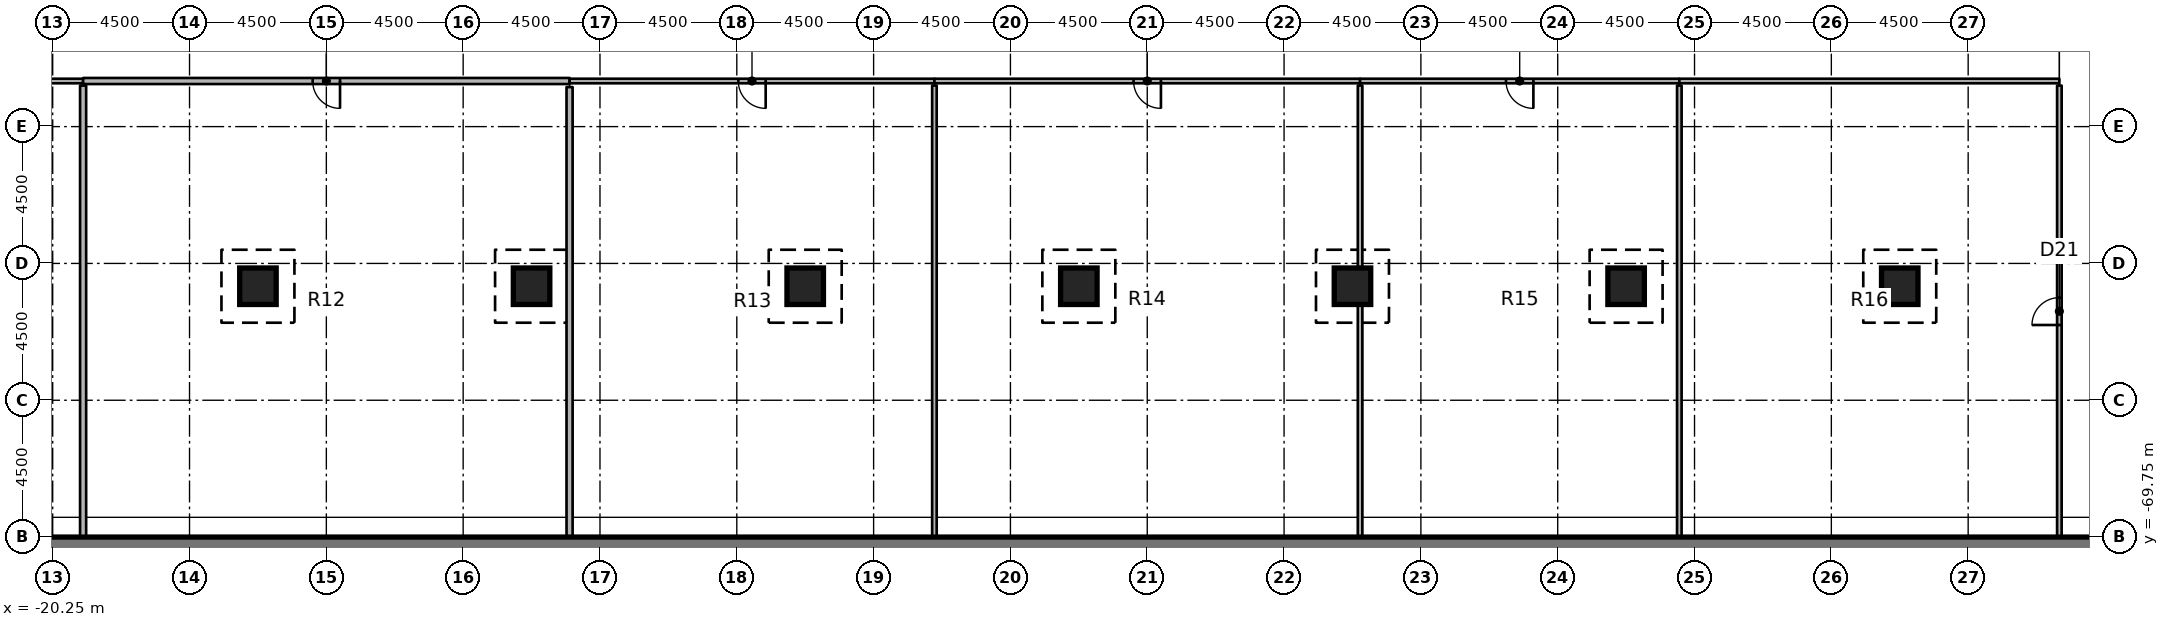
"""IFC4 building model, lengths in metres.
Left out: names, types, materials, properties, quantities, classifications, styles, units other than length and angle.
Written with IfcOpenShell. Run it as: python <this file> out.ifc"""

import sys

from ifc_helpers import new_model, si_unit, direction, frame, frame_2d, origin, origin_2d, place, context, subcontext, project, spatial, rectangle, extrude, element, fill, save


model = new_model("IFC4")
c1 = context("Model", 3, precision=1e-05, world=origin(), true_north=direction((0.0, 1.0)))
c2 = subcontext(c1, "Body", "Model", "MODEL_VIEW")
j1 = project(units=[si_unit("LENGTHUNIT", "METRE"), si_unit("PLANEANGLEUNIT", "RADIAN")], contexts=[c1])
p1 = place(None, origin())
s1 = spatial("IfcSite", under=j1, at=p1, CompositionType="ELEMENT")
p2 = place(p1, origin())
s2 = spatial("IfcBuilding", under=s1, at=p2, CompositionType="ELEMENT")
p3 = place(p2, frame((0.0, 0.0, -8.0)))
s3 = spatial("IfcBuildingStorey", under=s2, at=p3, CompositionType="ELEMENT", Elevation=-8.0)
for number, where, z_axis, x_axis in (
    (1, (-13.5, -61.5, 0.0), (0.0, 0.0, 1.0), (1.0, 0.0, 0.0)),
    (2, (-4.5, -61.5, 0.0), (0.0, 0.0, 1.0), (1.0, 0.0, 0.0)),
    (3, (4.5, -61.5, 0.0), (0.0, 0.0, 1.0), (1.0, 0.0, 0.0)),
    (4, (13.5, -61.5, 0.0), (0.0, 0.0, 1.0), (1.0, 0.0, 0.0)),
    (5, (22.5, -61.5, 0.0), (0.0, 0.0, 1.0), (1.0, 0.0, 0.0)),
    (6, (31.5, -61.5, 0.0), (0.0, 0.0, 1.0), (1.0, 0.0, 0.0)),
    (7, (40.5, -61.5, 0.0), (0.0, 0.0, 1.0), (1.0, 0.0, 0.0)),
):
    element("IfcColumn", number, at=place(p3, frame(where, z_axis=z_axis, x_axis=x_axis)), inside=s3, PredefinedType="COLUMN", context=c2, shape_type="SweptSolid", body=[
        extrude(rectangle(XDim=1.2, YDim=1.2, at=origin_2d()), origin(), (0.0, 0.0, 1.0), 3.4),
    ])
p4 = place(p3, frame((-61.25, -70.0, 0.0), z_axis=(0.0, 0.0, 1.0), x_axis=(1.0, 0.0, 0.0)))
e8 = element("IfcWall", 8, at=p4, inside=s3, PredefinedType="SOLIDWALL", context=c2, shape_type="SweptSolid", body=[
    extrude(rectangle(XDim=122.5, YDim=0.5, at=frame_2d((61.25, 0.0))), origin(), (0.0, 0.0, 1.0), 4.0),
])
p5 = place(p3, frame((-19.25, -54.75, 0.0), z_axis=(0.0, 0.0, 1.0), x_axis=(-1.0, 0.0, 0.0)))
e9 = element("IfcWall", 9, at=p5, inside=s3, PredefinedType="PARTITIONING", context=c2, shape_type="SweptSolid", body=[
    extrude(rectangle(XDim=11.0, YDim=0.15, at=frame_2d((5.5, 0.0))), origin(), (0.0, 0.0, 1.0), 3.4),
])
p6 = place(p5, frame((5.05, 0.0, 0.0)))
e10 = element("IfcOpeningElement", 10, at=p6, cuts=e9, PredefinedType="OPENING", context=c2, shape_type="SweptSolid", body=[
    extrude(rectangle(XDim=0.9, YDim=2.1, at=frame_2d((0.45, 1.05))), frame((0.0, 0.085, 0.0), z_axis=(0.0, -1.0, 0.0), x_axis=(1.0, 0.0, 0.0)), (0.0, 0.0, 1.0), 0.17),
])
p7 = place(p3, frame((-3.25, -54.75, 0.0), z_axis=(0.0, 0.0, 1.0), x_axis=(-1.0, 0.0, 0.0)))
e11 = element("IfcWall", 11, at=p7, inside=s3, PredefinedType="PARTITIONING", context=c2, shape_type="SweptSolid", body=[
    extrude(rectangle(XDim=16.0, YDim=0.2, at=frame_2d((8.0, 0.0))), origin(), (0.0, 0.0, 1.0), 3.4),
])
p8 = place(p7, frame((7.55, 0.0, 0.0)))
e12 = element("IfcOpeningElement", 12, at=p8, cuts=e11, PredefinedType="OPENING", context=c2, shape_type="SweptSolid", body=[
    extrude(rectangle(XDim=0.9, YDim=2.1, at=frame_2d((0.45, 1.05))), frame((0.0, 0.11, 0.0), z_axis=(0.0, -1.0, 0.0), x_axis=(1.0, 0.0, 0.0)), (0.0, 0.0, 1.0), 0.22),
])
p9 = place(p3, frame((8.75, -54.75, 0.0), z_axis=(0.0, 0.0, 1.0), x_axis=(-1.0, 0.0, 0.0)))
e13 = element("IfcWall", 13, at=p9, inside=s3, PredefinedType="PARTITIONING", context=c2, shape_type="SweptSolid", body=[
    extrude(rectangle(XDim=12.0, YDim=0.15, at=frame_2d((6.0, 0.0))), origin(), (0.0, 0.0, 1.0), 3.4),
])
p10 = place(p9, frame((5.55, 0.0, 0.0)))
e14 = element("IfcOpeningElement", 14, at=p10, cuts=e13, PredefinedType="OPENING", context=c2, shape_type="SweptSolid", body=[
    extrude(rectangle(XDim=0.9, YDim=2.1, at=frame_2d((0.45, 1.05))), frame((0.0, 0.085, 0.0), z_axis=(0.0, -1.0, 0.0), x_axis=(1.0, 0.0, 0.0)), (0.0, 0.0, 1.0), 0.17),
])
p11 = place(p3, frame((22.75, -54.75, 0.0), z_axis=(0.0, 0.0, 1.0), x_axis=(-1.0, 0.0, 0.0)))
e15 = element("IfcWall", 15, at=p11, inside=s3, PredefinedType="PARTITIONING", context=c2, shape_type="SweptSolid", body=[
    extrude(rectangle(XDim=14.0, YDim=0.15, at=frame_2d((7.0, 0.0))), origin(), (0.0, 0.0, 1.0), 3.4),
])
p12 = place(p11, frame((6.55, 0.0, 0.0)))
e16 = element("IfcOpeningElement", 16, at=p12, cuts=e15, PredefinedType="OPENING", context=c2, shape_type="SweptSolid", body=[
    extrude(rectangle(XDim=0.9, YDim=2.1, at=frame_2d((0.45, 1.05))), frame((0.0, 0.085, 0.0), z_axis=(0.0, -1.0, 0.0), x_axis=(1.0, 0.0, 0.0)), (0.0, 0.0, 1.0), 0.17),
])
p13 = place(p3, frame((33.25, -54.75, 0.0), z_axis=(0.0, 0.0, 1.0), x_axis=(-1.0, 0.0, 0.0)))
e17 = element("IfcWall", 17, at=p13, inside=s3, PredefinedType="PARTITIONING", context=c2, shape_type="SweptSolid", body=[
    extrude(rectangle(XDim=10.5, YDim=0.15, at=frame_2d((5.25, 0.0))), origin(), (0.0, 0.0, 1.0), 3.4),
])
p14 = place(p13, frame((4.8, 0.0, 0.0)))
e18 = element("IfcOpeningElement", 18, at=p14, cuts=e17, PredefinedType="OPENING", context=c2, shape_type="SweptSolid", body=[
    extrude(rectangle(XDim=0.9, YDim=2.1, at=frame_2d((0.45, 1.05))), frame((0.0, 0.085, 0.0), z_axis=(0.0, -1.0, 0.0), x_axis=(1.0, 0.0, 0.0)), (0.0, 0.0, 1.0), 0.17),
])
p15 = place(p3, frame((45.75, -54.75, 0.0), z_axis=(0.0, 0.0, 1.0), x_axis=(-1.0, 0.0, 0.0)))
e19 = element("IfcWall", 19, at=p15, inside=s3, PredefinedType="PARTITIONING", context=c2, shape_type="SweptSolid", body=[
    extrude(rectangle(XDim=12.5, YDim=0.15, at=frame_2d((6.25, 0.0))), origin(), (0.0, 0.0, 1.0), 3.4),
])
p16 = place(p3, frame((-19.25, -54.9, 0.0), z_axis=(0.0, 0.0, 1.0), x_axis=(0.0, -1.0, 0.0)))
e20 = element("IfcWall", 20, at=p16, inside=s3, PredefinedType="PARTITIONING", context=c2, shape_type="SweptSolid", body=[
    extrude(rectangle(XDim=14.85, YDim=0.2, at=frame_2d((7.425, 0.0))), origin(), (0.0, 0.0, 1.0), 3.4),
])
p17 = place(p3, frame((-3.25, -54.95, 0.0), z_axis=(0.0, 0.0, 1.0), x_axis=(0.0, -1.0, 0.0)))
e21 = element("IfcWall", 21, at=p17, inside=s3, PredefinedType="PARTITIONING", context=c2, shape_type="SweptSolid", body=[
    extrude(rectangle(XDim=14.8, YDim=0.2, at=frame_2d((7.4, 0.0))), origin(), (0.0, 0.0, 1.0), 3.4),
])
p18 = place(p3, frame((8.75, -54.9, 0.0), z_axis=(0.0, 0.0, 1.0), x_axis=(0.0, -1.0, 0.0)))
e22 = element("IfcWall", 22, at=p18, inside=s3, PredefinedType="PARTITIONING", context=c2, shape_type="SweptSolid", body=[
    extrude(rectangle(XDim=14.85, YDim=0.15, at=frame_2d((7.425, 0.0))), origin(), (0.0, 0.0, 1.0), 3.4),
])
p19 = place(p3, frame((22.75, -54.9, 0.0), z_axis=(0.0, 0.0, 1.0), x_axis=(0.0, -1.0, 0.0)))
e23 = element("IfcWall", 23, at=p19, inside=s3, PredefinedType="PARTITIONING", context=c2, shape_type="SweptSolid", body=[
    extrude(rectangle(XDim=6.0, YDim=0.15, at=frame_2d((3.0, 0.0))), origin(), (0.0, 0.0, 1.0), 3.4),
])
p20 = place(p3, frame((22.75, -62.1, 0.0), z_axis=(0.0, 0.0, 1.0), x_axis=(0.0, -1.0, 0.0)))
e24 = element("IfcWall", 24, at=p20, inside=s3, PredefinedType="PARTITIONING", context=c2, shape_type="SweptSolid", body=[
    extrude(rectangle(XDim=7.65, YDim=0.15, at=frame_2d((3.825, 0.0))), origin(), (0.0, 0.0, 1.0), 3.4),
])
p21 = place(p3, frame((33.25, -54.9, 0.0), z_axis=(0.0, 0.0, 1.0), x_axis=(0.0, -1.0, 0.0)))
e25 = element("IfcWall", 25, at=p21, inside=s3, PredefinedType="PARTITIONING", context=c2, shape_type="SweptSolid", body=[
    extrude(rectangle(XDim=14.85, YDim=0.15, at=frame_2d((7.425, 0.0))), origin(), (0.0, 0.0, 1.0), 3.4),
])
p22 = place(p3, frame((45.75, -69.75, 0.0), z_axis=(0.0, 0.0, 1.0), x_axis=(0.0, 1.0, 0.0)))
e26 = element("IfcWall", 26, at=p22, inside=s3, PredefinedType="PARTITIONING", context=c2, shape_type="SweptSolid", body=[
    extrude(rectangle(XDim=14.85, YDim=0.15, at=frame_2d((7.425, 0.0))), origin(), (0.0, 0.0, 1.0), 3.4),
])
p23 = place(p22, frame((6.975, 0.0, 0.0)))
e27 = element("IfcOpeningElement", 27, at=p23, cuts=e26, PredefinedType="OPENING", context=c2, shape_type="SweptSolid", body=[
    extrude(rectangle(XDim=0.9, YDim=2.1, at=frame_2d((0.45, 1.05))), frame((0.0, 0.085, 0.0), z_axis=(0.0, -1.0, 0.0), x_axis=(1.0, 0.0, 0.0)), (0.0, 0.0, 1.0), 0.17),
])
p24 = place(p8, origin())
e28 = element("IfcDoor", 28, at=p24, inside=s3, OperationType="SINGLE_SWING_LEFT", PredefinedType="DOOR", context=c2, shape_type="SweptSolid", body=[
    extrude(rectangle(XDim=0.9, YDim=2.1, at=frame_2d((0.45, 1.05))), frame((0.0, 0.025, 0.0), z_axis=(0.0, -1.0, 0.0), x_axis=(1.0, 0.0, 0.0)), (0.0, 0.0, 1.0), 0.05),
])
fill(e12, e28)
p25 = place(p10, origin())
e29 = element("IfcDoor", 29, at=p25, inside=s3, OperationType="SINGLE_SWING_LEFT", PredefinedType="DOOR", context=c2, shape_type="SweptSolid", body=[
    extrude(rectangle(XDim=0.9, YDim=2.1, at=frame_2d((0.45, 1.05))), frame((0.0, 0.025, 0.0), z_axis=(0.0, -1.0, 0.0), x_axis=(1.0, 0.0, 0.0)), (0.0, 0.0, 1.0), 0.05),
])
fill(e14, e29)
p26 = place(p12, origin())
e30 = element("IfcDoor", 30, at=p26, inside=s3, OperationType="SINGLE_SWING_LEFT", PredefinedType="DOOR", context=c2, shape_type="SweptSolid", body=[
    extrude(rectangle(XDim=0.9, YDim=2.1, at=frame_2d((0.45, 1.05))), frame((0.0, 0.025, 0.0), z_axis=(0.0, -1.0, 0.0), x_axis=(1.0, 0.0, 0.0)), (0.0, 0.0, 1.0), 0.05),
])
fill(e16, e30)
p27 = place(p14, origin())
e31 = element("IfcDoor", 31, at=p27, inside=s3, OperationType="SINGLE_SWING_LEFT", PredefinedType="DOOR", context=c2, shape_type="SweptSolid", body=[
    extrude(rectangle(XDim=0.9, YDim=2.1, at=frame_2d((0.45, 1.05))), frame((0.0, 0.025, 0.0), z_axis=(0.0, -1.0, 0.0), x_axis=(1.0, 0.0, 0.0)), (0.0, 0.0, 1.0), 0.05),
])
fill(e18, e31)
p28 = place(p23, origin())
e32 = element("IfcDoor", 32, at=p28, inside=s3, OperationType="SINGLE_SWING_LEFT", PredefinedType="DOOR", context=c2, shape_type="SweptSolid", body=[
    extrude(rectangle(XDim=0.9, YDim=2.1, at=frame_2d((0.45, 1.05))), frame((0.0, 0.025, 0.0), z_axis=(0.0, -1.0, 0.0), x_axis=(1.0, 0.0, 0.0)), (0.0, 0.0, 1.0), 0.05),
])
fill(e27, e32)
save(model, sys.argv[1])
